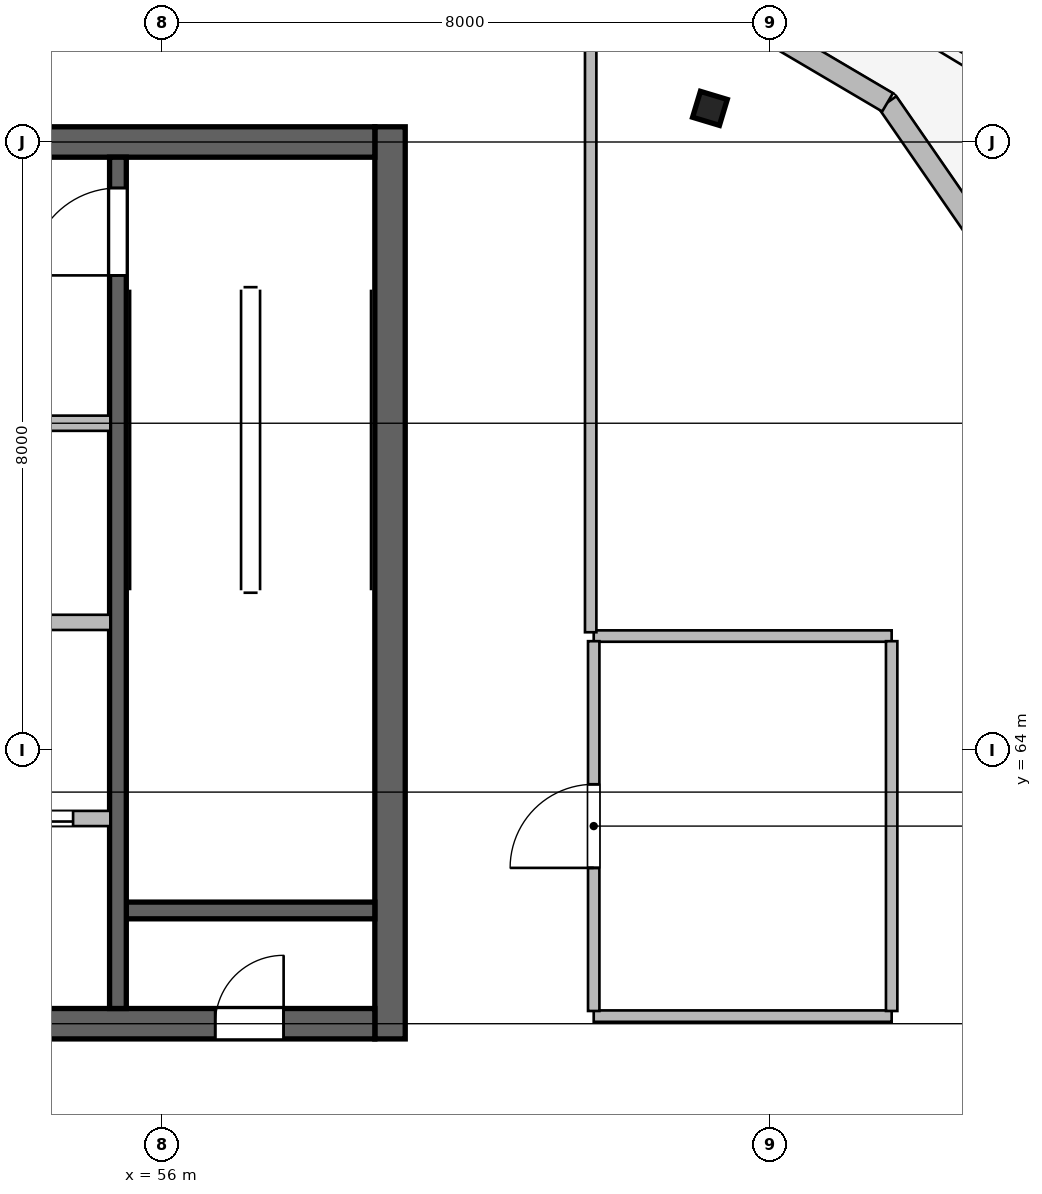
"""IFC4 building model, lengths in metres.
Left out: names, types, materials, properties, quantities, classifications, styles, units other than length and angle.
Written with IfcOpenShell. Run it as: python <this file> out.ifc"""

import sys

from ifc_helpers import new_model, si_unit, direction, frame, frame_2d, origin, origin_2d, place, context, subcontext, project, spatial, rectangle, i_section, extrude, source, transform, mapped, element, fill, save


model = new_model("IFC4")
c1 = context("Model", 3, precision=1e-05, world=origin(), true_north=direction((0.0, 1.0)))
c2 = subcontext(c1, "Body", "Model", "MODEL_VIEW")
j1 = project(units=[si_unit("LENGTHUNIT", "METRE"), si_unit("PLANEANGLEUNIT", "RADIAN")], contexts=[c1])
p1 = place(None, origin())
s1 = spatial("IfcSite", under=j1, at=p1, CompositionType="ELEMENT")
p2 = place(p1, origin())
s2 = spatial("IfcBuilding", under=s1, at=p2, CompositionType="ELEMENT")
p3 = place(p2, frame((0.0, 0.0, 312.6)))
s3 = spatial("IfcBuildingStorey", under=s2, at=p3, CompositionType="ELEMENT", Elevation=312.6)
m1 = source(origin(), c2, "Body", "SweptSolid", [
    extrude(rectangle(XDim=12.0, YDim=0.4, at=frame_2d((6.0, 0.0))), origin(), (0.0, 0.0, 1.0), 5.4),
])
p4 = place(p3, frame((59.0, 60.2, 0.0), z_axis=(0.0, 0.0, 1.0), x_axis=(0.0, 1.0, 0.0)))
e1 = element("IfcWall", 1, at=p4, inside=s3, PredefinedType="SHEAR", context=c2, shape_type="MappedRepresentation", body=[
    mapped(m1, transform((0.0, 0.0, 0.0), scale=1.0)),
])
m2 = source(origin(), c2, "Body", "SweptSolid", [
    extrude(rectangle(XDim=21.6, YDim=0.4, at=frame_2d((10.8, 0.0))), origin(), (0.0, 0.0, 1.0), 5.4),
])
p5 = place(p3, frame((37.2, 60.4, 0.0), z_axis=(0.0, 0.0, 1.0), x_axis=(1.0, 0.0, 0.0)))
e2 = element("IfcWall", 2, at=p5, inside=s3, PredefinedType="SHEAR", context=c2, shape_type="MappedRepresentation", body=[
    mapped(m2, transform((0.0, 0.0, 0.0), scale=1.0)),
])
p6 = place(p5, frame((1.1, 0.0, 0.0)))
e3 = element("IfcOpeningElement", 3, at=p6, cuts=e2, PredefinedType="OPENING", context=c2, shape_type="SweptSolid", body=[
    extrude(rectangle(XDim=1.15, YDim=2.15, at=frame_2d((0.575, 1.075))), frame((0.0, 0.21, 0.0), z_axis=(0.0, -1.0, 0.0), x_axis=(1.0, 0.0, 0.0)), (0.0, 0.0, 1.0), 0.42),
])
p7 = place(p5, frame((19.5, 0.0, 0.0)))
e4 = element("IfcOpeningElement", 4, at=p7, cuts=e2, PredefinedType="OPENING", context=c2, shape_type="SweptSolid", body=[
    extrude(rectangle(XDim=0.9, YDim=2.1, at=frame_2d((0.45, 1.05))), frame((0.0, 0.21, 0.0), z_axis=(0.0, -1.0, 0.0), x_axis=(1.0, 0.0, 0.0)), (0.0, 0.0, 1.0), 0.42),
])
p8 = place(p5, frame((12.02, 0.0, 0.0)))
e5 = element("IfcOpeningElement", 5, at=p8, cuts=e2, PredefinedType="OPENING", context=c2, shape_type="SweptSolid", body=[
    extrude(rectangle(XDim=1.6, YDim=2.15, at=frame_2d((0.8, 1.075))), frame((0.0, 0.21, 0.0), z_axis=(0.0, -1.0, 0.0), x_axis=(1.0, 0.0, 0.0)), (0.0, 0.0, 1.0), 0.42),
])
p9 = place(p3, frame((37.2, 72.0, 0.0), z_axis=(0.0, 0.0, 1.0), x_axis=(1.0, 0.0, 0.0)))
e6 = element("IfcWall", 6, at=p9, inside=s3, PredefinedType="SHEAR", context=c2, shape_type="MappedRepresentation", body=[
    mapped(m2, transform((0.0, 0.0, 0.0), scale=1.0)),
])
p10 = place(p9, frame((1.2, 0.0, 0.0)))
e7 = element("IfcOpeningElement", 7, at=p10, cuts=e6, PredefinedType="OPENING", context=c2, shape_type="SweptSolid", body=[
    extrude(rectangle(XDim=0.9, YDim=2.1, at=frame_2d((0.45, 1.05))), frame((0.0, 0.21, 0.0), z_axis=(0.0, -1.0, 0.0), x_axis=(1.0, 0.0, 0.0)), (0.0, 0.0, 1.0), 0.42),
])
p11 = place(p9, frame((14.7, 0.0, 0.0)))
e8 = element("IfcOpeningElement", 8, at=p11, cuts=e6, PredefinedType="OPENING", context=c2, shape_type="SweptSolid", body=[
    extrude(rectangle(XDim=1.2, YDim=2.15, at=frame_2d((0.6, 1.075))), frame((0.0, 0.21, 0.0), z_axis=(0.0, -1.0, 0.0), x_axis=(1.0, 0.0, 0.0)), (0.0, 0.0, 1.0), 0.42),
])
p12 = place(p9, frame((4.15, 0.0, 0.0)))
e9 = element("IfcOpeningElement", 9, at=p12, cuts=e6, PredefinedType="OPENING", context=c2, shape_type="SweptSolid", body=[
    extrude(rectangle(XDim=1.3, YDim=2.15, at=frame_2d((0.65, 1.075))), frame((0.0, 0.21, 0.0), z_axis=(0.0, -1.0, 0.0), x_axis=(1.0, 0.0, 0.0)), (0.0, 0.0, 1.0), 0.42),
])
p13 = place(p9, frame((7.25, 0.0, 0.0)))
e10 = element("IfcOpeningElement", 10, at=p13, cuts=e6, PredefinedType="OPENING", context=c2, shape_type="SweptSolid", body=[
    extrude(rectangle(XDim=0.9, YDim=2.1, at=frame_2d((0.45, 1.05))), frame((0.0, 0.21, 0.0), z_axis=(0.0, -1.0, 0.0), x_axis=(1.0, 0.0, 0.0)), (0.0, 0.0, 1.0), 0.42),
])
m3 = source(origin(), c2, "Body", "SweptSolid", [
    extrude(rectangle(XDim=3.27, YDim=0.22, at=frame_2d((1.635, 0.0))), origin(), (0.0, 0.0, 1.0), 5.4),
])
p14 = place(p3, frame((55.53, 61.89, 0.0), z_axis=(0.0, 0.0, 1.0), x_axis=(1.0, 0.0, 0.0)))
e11 = element("IfcWall", 11, at=p14, inside=s3, PredefinedType="SHEAR", context=c2, shape_type="MappedRepresentation", body=[
    mapped(m3, transform((0.0, 0.0, 0.0), scale=1.0)),
])
m4 = source(origin(), c2, "Body", "SweptSolid", [
    extrude(rectangle(XDim=11.2, YDim=0.22, at=frame_2d((5.6, 0.0))), origin(), (0.0, 0.0, 1.0), 5.4),
])
p15 = place(p3, frame((55.42, 60.6, 0.0), z_axis=(0.0, 0.0, 1.0), x_axis=(0.0, 1.0, 0.0)))
e12 = element("IfcWall", 12, at=p15, inside=s3, PredefinedType="SHEAR", context=c2, shape_type="MappedRepresentation", body=[
    mapped(m4, transform((0.0, 0.0, 0.0), scale=1.0)),
])
p16 = place(p15, frame((9.645, 0.0, 0.0)))
e13 = element("IfcOpeningElement", 13, at=p16, cuts=e12, PredefinedType="OPENING", context=c2, shape_type="SweptSolid", body=[
    extrude(rectangle(XDim=1.15, YDim=2.15, at=frame_2d((0.575, 1.075))), frame((0.0, 0.12, 0.0), z_axis=(0.0, -1.0, 0.0), x_axis=(1.0, 0.0, 0.0)), (0.0, 0.0, 1.0), 0.24),
])
m5 = source(origin(), c2, "Body", "SweptSolid", [
    extrude(i_section(OverallWidth=0.369, OverallDepth=0.356, WebThickness=0.011, FlangeThickness=0.018, at=origin_2d()), origin(), (0.0, 0.0, 1.0), 5.4),
])
p17 = place(p3, frame((63.209, 72.442, 0.0), z_axis=(0.0, 0.0, 1.0), x_axis=(0.288697611798, 0.957420330337, 0.0)))
e14 = element("IfcColumn", 14, at=p17, inside=s3, PredefinedType="COLUMN", context=c2, shape_type="MappedRepresentation", body=[
    mapped(m5, transform((0.0, 0.0, 0.0), scale=1.0)),
])
m6 = source(origin(), c2, "Body", "SweptSolid", [
    extrude(rectangle(XDim=5.181, YDim=0.28, at=frame_2d((2.591, 0.0))), origin(), (0.0, 0.0, 1.0), 5.12),
])
p18 = place(p3, frame((65.546, 72.522, 0.0), z_axis=(0.0, 0.0, 1.0), x_axis=(0.568207430175, -0.82288536036, 0.0)))
e15 = element("IfcWall", 15, at=p18, inside=s3, PredefinedType="SOLIDWALL", context=c2, shape_type="MappedRepresentation", body=[
    mapped(m6, transform((0.0, 0.0, 0.0), scale=1.0)),
])
p19 = place(p18, frame((1.991, 0.0, 0.0)))
e16 = element("IfcOpeningElement", 16, at=p19, cuts=e15, PredefinedType="OPENING", context=c2, shape_type="SweptSolid", body=[
    extrude(rectangle(XDim=1.2, YDim=2.2, at=frame_2d((0.6, 1.1))), frame((0.0, 0.15, 0.0), z_axis=(0.0, -1.0, 0.0), x_axis=(1.0, 0.0, 0.0)), (0.0, 0.0, 1.0), 0.3),
])
m7 = source(origin(), c2, "Body", "SweptSolid", [
    extrude(rectangle(XDim=1.911, YDim=0.28, at=frame_2d((0.956, 0.0))), origin(), (0.0, 0.0, 1.0), 5.12),
])
p20 = place(p3, frame((63.9, 73.493, 0.0), z_axis=(0.0, 0.0, 1.0), x_axis=(0.861434684646, -0.507868372798, 0.0)))
e17 = element("IfcWall", 17, at=p20, inside=s3, PredefinedType="SOLIDWALL", context=c2, shape_type="MappedRepresentation", body=[
    mapped(m7, transform((0.0, 0.0, 0.0), scale=1.0)),
])
m8 = source(origin(), c2, "Body", "SweptSolid", [
    extrude(rectangle(XDim=5.62, YDim=0.2, at=frame_2d((2.81, 0.0))), origin(), (0.0, 0.0, 1.0), 5.12),
])
p21 = place(p3, frame((49.7, 68.3, 0.0), z_axis=(0.0, 0.0, 1.0), x_axis=(1.0, 0.0, 0.0)))
e18 = element("IfcWall", 18, at=p21, inside=s3, PredefinedType="SOLIDWALL", context=c2, shape_type="MappedRepresentation", body=[
    mapped(m8, transform((0.0, 0.0, 0.0), scale=1.0)),
])
p22 = place(p21, frame((1.6, 0.0, 0.0)))
e19 = element("IfcOpeningElement", 19, at=p22, cuts=e18, PredefinedType="OPENING", context=c2, shape_type="SweptSolid", body=[
    extrude(rectangle(XDim=1.1, YDim=2.15, at=frame_2d((0.55, 1.075))), frame((0.0, 0.11, 0.0), z_axis=(0.0, -1.0, 0.0), x_axis=(1.0, 0.0, 0.0)), (0.0, 0.0, 1.0), 0.22),
])
p23 = place(p21, frame((3.7, 0.0, 0.0)))
e20 = element("IfcOpeningElement", 20, at=p23, cuts=e18, PredefinedType="OPENING", context=c2, shape_type="SweptSolid", body=[
    extrude(rectangle(XDim=1.1, YDim=2.15, at=frame_2d((0.55, 1.075))), frame((0.0, 0.11, 0.0), z_axis=(0.0, -1.0, 0.0), x_axis=(1.0, 0.0, 0.0)), (0.0, 0.0, 1.0), 0.22),
])
p24 = place(p3, frame((49.7, 65.68, 0.0), z_axis=(0.0, 0.0, 1.0), x_axis=(1.0, 0.0, 0.0)))
e21 = element("IfcWall", 21, at=p24, inside=s3, PredefinedType="SOLIDWALL", context=c2, shape_type="MappedRepresentation", body=[
    mapped(m8, transform((0.0, 0.0, 0.0), scale=1.0)),
])
m9 = source(origin(), c2, "Body", "SweptSolid", [
    extrude(rectangle(XDim=4.1, YDim=0.2, at=frame_2d((2.05, 0.0))), origin(), (0.0, 0.0, 1.0), 5.12),
])
p25 = place(p3, frame((51.22, 63.1, 0.0), z_axis=(0.0, 0.0, 1.0), x_axis=(1.0, 0.0, 0.0)))
e22 = element("IfcWall", 22, at=p25, inside=s3, PredefinedType="SOLIDWALL", context=c2, shape_type="MappedRepresentation", body=[
    mapped(m9, transform((0.0, 0.0, 0.0), scale=1.0)),
])
p26 = place(p25, frame((0.51, 0.0, 0.0)))
e23 = element("IfcOpeningElement", 23, at=p26, cuts=e22, PredefinedType="OPENING", context=c2, shape_type="SweptSolid", body=[
    extrude(rectangle(XDim=1.1, YDim=2.15, at=frame_2d((0.55, 1.075))), frame((0.0, 0.11, 0.0), z_axis=(0.0, -1.0, 0.0), x_axis=(1.0, 0.0, 0.0)), (0.0, 0.0, 1.0), 0.22),
])
p27 = place(p25, frame((2.51, 0.0, 0.0)))
e24 = element("IfcOpeningElement", 24, at=p27, cuts=e22, PredefinedType="OPENING", context=c2, shape_type="SweptSolid", body=[
    extrude(rectangle(XDim=1.1, YDim=2.15, at=frame_2d((0.55, 1.075))), frame((0.0, 0.11, 0.0), z_axis=(0.0, -1.0, 0.0), x_axis=(1.0, 0.0, 0.0)), (0.0, 0.0, 1.0), 0.22),
])
m10 = source(origin(), c2, "Body", "SweptSolid", [
    extrude(rectangle(XDim=3.92, YDim=0.15, at=frame_2d((1.96, 0.0))), origin(), (0.0, 0.0, 1.0), 5.12),
])
for number, where, z_axis, x_axis in (
    (25, (61.68, 60.5, 0.0), (0.0, 0.0, 1.0), (1.0, 0.0, 0.0)),
    (26, (61.68, 65.5, 0.0), (0.0, 0.0, 1.0), (1.0, 0.0, 0.0)),
):
    element("IfcWall", number, at=place(p3, frame(where, z_axis=z_axis, x_axis=x_axis)), inside=s3, PredefinedType="PARTITIONING", context=c2, shape_type="MappedRepresentation", body=[
        mapped(m10, transform((0.0, 0.0, 0.0), scale=1.0)),
    ])
m11 = source(origin(), c2, "Body", "SweptSolid", [
    extrude(rectangle(XDim=4.865, YDim=0.15, at=frame_2d((2.433, 0.0))), origin(), (0.0, 0.0, 1.0), 5.12),
])
p28 = place(p3, frame((61.68, 60.567, 0.0), z_axis=(0.0, 0.0, 1.0), x_axis=(0.0, 1.0, 0.0)))
e27 = element("IfcWall", 27, at=p28, inside=s3, PredefinedType="PARTITIONING", context=c2, shape_type="MappedRepresentation", body=[
    mapped(m11, transform((0.0, 0.0, 0.0), scale=1.0)),
])
p29 = place(p28, frame((1.883, 0.0, 0.0)))
e28 = element("IfcOpeningElement", 28, at=p29, cuts=e27, PredefinedType="OPENING", context=c2, shape_type="SweptSolid", body=[
    extrude(rectangle(XDim=1.1, YDim=2.15, at=frame_2d((0.55, 1.075))), frame((0.0, 0.085, 0.0), z_axis=(0.0, -1.0, 0.0), x_axis=(1.0, 0.0, 0.0)), (0.0, 0.0, 1.0), 0.17),
])
p30 = place(p3, frame((65.6, 60.567, 0.0), z_axis=(0.0, 0.0, 1.0), x_axis=(0.0, 1.0, 0.0)))
e29 = element("IfcWall", 29, at=p30, inside=s3, PredefinedType="PARTITIONING", context=c2, shape_type="MappedRepresentation", body=[
    mapped(m11, transform((0.0, 0.0, 0.0), scale=1.0)),
])
m12 = source(origin(), c2, "Body", "SweptSolid", [
    extrude(rectangle(XDim=8.962, YDim=0.15, at=frame_2d((4.481, 0.0))), origin(), (0.0, 0.0, 1.0), 5.12),
])
p31 = place(p3, frame((61.64, 65.55, 0.0), z_axis=(0.0, 0.0, 1.0), x_axis=(0.0, 1.0, 0.0)))
e30 = element("IfcWall", 30, at=p31, inside=s3, PredefinedType="PARTITIONING", context=c2, shape_type="MappedRepresentation", body=[
    mapped(m12, transform((0.0, 0.0, 0.0), scale=1.0)),
])
m13 = source(origin(), c2, "Body", "SweptSolid", [
    extrude(rectangle(XDim=0.9, YDim=2.1, at=frame_2d((0.45, 1.05))), frame((0.0, 0.025, 0.0), z_axis=(0.0, -1.0, 0.0), x_axis=(1.0, 0.0, 0.0)), (0.0, 0.0, 1.0), 0.05),
])
p32 = place(p7, origin())
e31 = element("IfcDoor", 31, at=p32, inside=s3, OperationType="SINGLE_SWING_RIGHT", PredefinedType="DOOR", context=c2, shape_type="MappedRepresentation", body=[
    mapped(m13, transform((0.0, 0.0, 0.0), scale=1.0)),
])
fill(e4, e31)
m14 = source(origin(), c2, "Body", "SweptSolid", [
    extrude(rectangle(XDim=1.15, YDim=2.15, at=frame_2d((0.575, 1.075))), frame((0.0, 0.025, 0.0), z_axis=(0.0, -1.0, 0.0), x_axis=(1.0, 0.0, 0.0)), (0.0, 0.0, 1.0), 0.05),
])
p33 = place(p16, origin())
e32 = element("IfcDoor", 32, at=p33, inside=s3, OperationType="SINGLE_SWING_LEFT", PredefinedType="DOOR", context=c2, shape_type="MappedRepresentation", body=[
    mapped(m14, transform((0.0, 0.0, 0.0), scale=1.0)),
])
fill(e13, e32)
m15 = source(origin(), c2, "Body", "SweptSolid", [
    extrude(rectangle(XDim=1.1, YDim=2.15, at=frame_2d((0.55, 1.075))), frame((0.0, 0.025, 0.0), z_axis=(0.0, -1.0, 0.0), x_axis=(1.0, 0.0, 0.0)), (0.0, 0.0, 1.0), 0.05),
])
p34 = place(p27, origin())
e33 = element("IfcDoor", 33, at=p34, inside=s3, OperationType="DOUBLE_DOOR_SLIDING", PredefinedType="DOOR", context=c2, shape_type="MappedRepresentation", body=[
    mapped(m15, transform((0.0, 0.0, 0.0), scale=1.0)),
])
fill(e24, e33)
m16 = source(origin(), c2, "Body", "SweptSolid", [
    extrude(rectangle(XDim=1.1, YDim=2.15, at=frame_2d((0.55, 1.075))), frame((0.0, 0.025, 0.0), z_axis=(0.0, -1.0, 0.0), x_axis=(1.0, 0.0, 0.0)), (0.0, 0.0, 1.0), 0.05),
])
p35 = place(p29, origin())
e34 = element("IfcDoor", 34, at=p35, inside=s3, OperationType="SINGLE_SWING_LEFT", PredefinedType="DOOR", context=c2, shape_type="MappedRepresentation", body=[
    mapped(m16, transform((0.0, 0.0, 0.0), scale=1.0)),
])
fill(e28, e34)
save(model, sys.argv[1])
